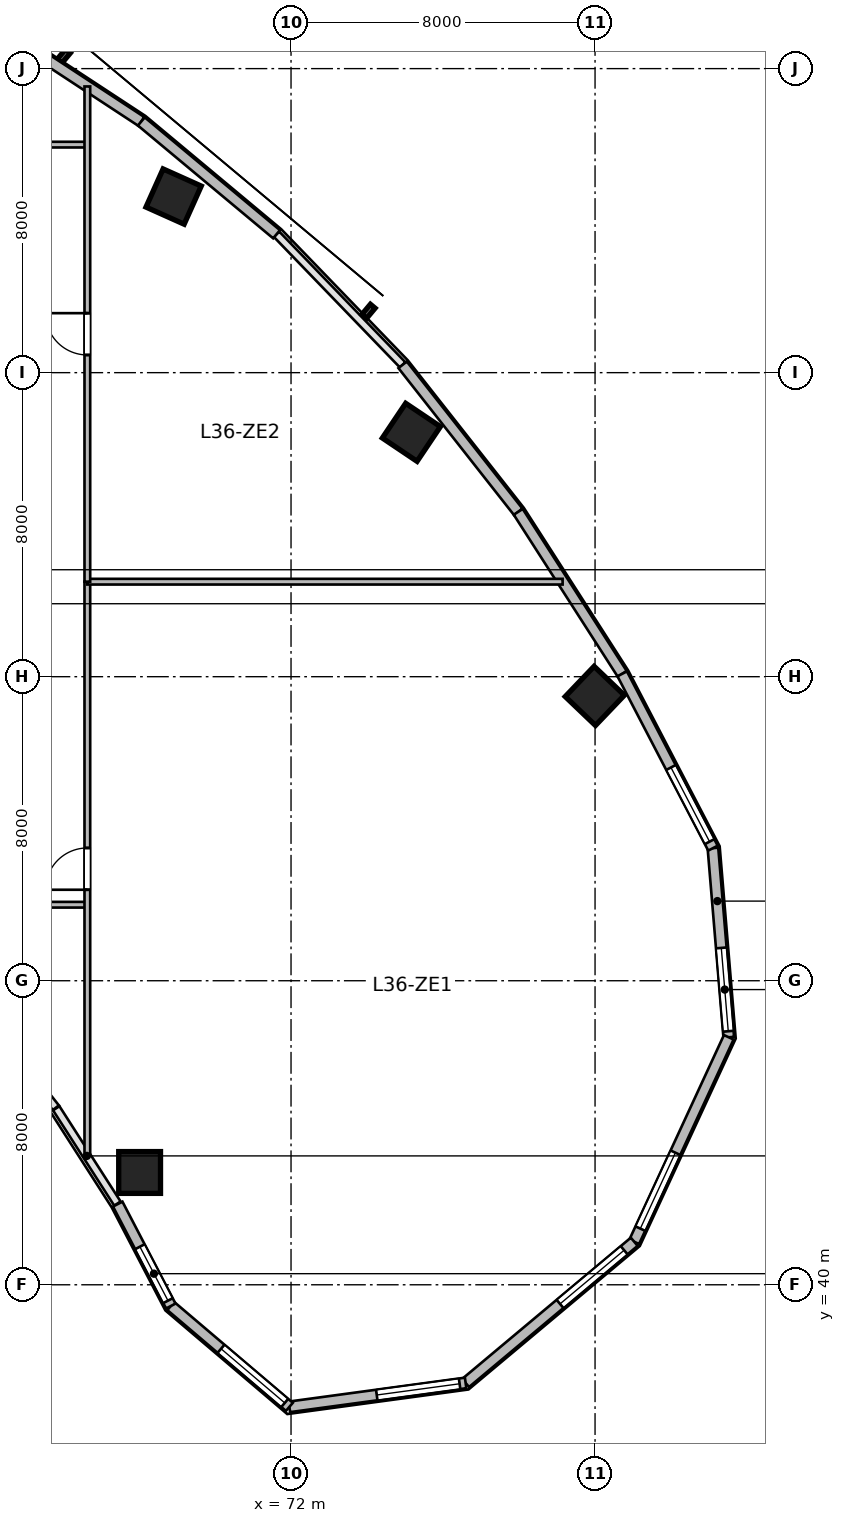
"""IFC4 building model, lengths in metres.
Left out: names, types, materials, properties, quantities, classifications, styles, units other than length and angle.
Written with IfcOpenShell. Run it as: python <this file> out.ifc"""

import sys

from ifc_helpers import new_model, si_unit, direction, frame, frame_2d, origin, origin_2d, place, context, subcontext, project, spatial, rectangle, circle, extrude, source, transform, mapped, element, fill, save


model = new_model("IFC4")
c1 = context("Model", 3, precision=1e-05, world=origin(), true_north=direction((0.0, 1.0)))
c2 = subcontext(c1, "Body", "Model", "MODEL_VIEW")
j1 = project(units=[si_unit("LENGTHUNIT", "METRE"), si_unit("PLANEANGLEUNIT", "RADIAN")], contexts=[c1])
p1 = place(None, origin())
s1 = spatial("IfcSite", under=j1, at=p1, CompositionType="ELEMENT")
p2 = place(p1, origin())
s2 = spatial("IfcBuilding", under=s1, at=p2, CompositionType="ELEMENT")
p3 = place(p2, frame((0.0, 0.0, 150.6)))
s3 = spatial("IfcBuildingStorey", under=s2, at=p3, CompositionType="ELEMENT", Elevation=150.6)
m1 = source(origin(), c2, "Body", "SweptSolid", [
    extrude(rectangle(XDim=1.1, YDim=1.1, at=origin_2d()), origin(), (0.0, 0.0, 1.0), 3.9),
])
for number, where, z_axis, x_axis in (
    (1, (68.91, 68.633, 0.0), (0.0, 0.0, 1.0), (0.409, 0.912, 0.0)),
    (2, (75.167, 62.43, 0.0), (0.0, 0.0, 1.0), (0.558, 0.83, 0.0)),
):
    element("IfcColumn", number, at=place(p3, frame(where, z_axis=z_axis, x_axis=x_axis)), inside=s3, PredefinedType="COLUMN", context=c2, shape_type="MappedRepresentation", body=[
        mapped(m1, transform((0.0, 0.0, 0.0), scale=1.0)),
    ])
m2 = source(origin(), c2, "Body", "SweptSolid", [
    extrude(circle(Radius=0.55, at=origin_2d()), origin(), (0.0, 0.0, 1.0), 3.9),
])
p4 = place(p3, frame((68.015, 42.955, 0.0), z_axis=(0.0, 0.0, 1.0), x_axis=(0.690756218984, 0.723087716626, 0.0)))
e3 = element("IfcColumn", 3, at=p4, inside=s3, PredefinedType="COLUMN", context=c2, shape_type="MappedRepresentation", body=[
    mapped(m2, transform((0.0, 0.0, 0.0), scale=1.0)),
])
p5 = place(p3, frame((79.993, 55.494, 0.0), z_axis=(0.0, 0.0, 1.0), x_axis=(0.690756218984, 0.723087716626, 0.0)))
e4 = element("IfcColumn", 4, at=p5, inside=s3, PredefinedType="COLUMN", context=c2, shape_type="MappedRepresentation", body=[
    mapped(m1, transform((0.0, 0.0, 0.0), scale=1.0)),
])
m3 = source(origin(), c2, "Body", "SweptSolid", [
    extrude(rectangle(XDim=4.994, YDim=0.28, at=frame_2d((2.497, 0.0))), origin(), (0.0, 0.0, 1.0), 3.65),
])
p6 = place(p3, frame((83.102, 51.489, 0.0), z_axis=(0.0, 0.0, 1.0), x_axis=(0.083344839916, -0.996520766296, 0.0)))
e5 = element("IfcWall", 5, at=p6, inside=s3, PredefinedType="SOLIDWALL", context=c2, shape_type="MappedRepresentation", body=[
    mapped(m3, transform((0.0, 0.0, 0.0), scale=1.0)),
])
p7 = place(p6, frame((2.635, 0.0, 0.95)))
e6 = element("IfcOpeningElement", 6, at=p7, cuts=e5, PredefinedType="OPENING", context=c2, shape_type="SweptSolid", body=[
    extrude(rectangle(XDim=2.2, YDim=2.1, at=frame_2d((1.1, 1.05))), frame((0.0, 0.15, 0.0), z_axis=(0.0, -1.0, 0.0), x_axis=(1.0, 0.0, 0.0)), (0.0, 0.0, 1.0), 0.3),
])
m4 = source(origin(), c2, "Body", "SweptSolid", [
    extrude(rectangle(XDim=5.927, YDim=0.28, at=frame_2d((2.964, 0.0))), origin(), (0.0, 0.0, 1.0), 3.65),
])
p8 = place(p3, frame((83.519, 46.512, 0.0), z_axis=(0.0, 0.0, 1.0), x_axis=(-0.419656204795, -0.907683132914, 0.0)))
e7 = element("IfcWall", 7, at=p8, inside=s3, PredefinedType="SOLIDWALL", context=c2, shape_type="MappedRepresentation", body=[
    mapped(m4, transform((0.0, 0.0, 0.0), scale=1.0)),
])
p9 = place(p8, frame((3.346, 0.0, 0.95)))
e8 = element("IfcOpeningElement", 8, at=p9, cuts=e7, PredefinedType="OPENING", context=c2, shape_type="SweptSolid", body=[
    extrude(rectangle(XDim=2.2, YDim=2.1, at=frame_2d((1.1, 1.05))), frame((0.0, 0.15, 0.0), z_axis=(0.0, -1.0, 0.0), x_axis=(1.0, 0.0, 0.0)), (0.0, 0.0, 1.0), 0.3),
])
m5 = source(origin(), c2, "Body", "SweptSolid", [
    extrude(rectangle(XDim=5.786, YDim=0.28, at=frame_2d((2.893, 0.0))), origin(), (0.0, 0.0, 1.0), 3.65),
])
p10 = place(p3, frame((81.031, 41.131, 0.0), z_axis=(0.0, 0.0, 1.0), x_axis=(-0.766711306852, -0.641992034176, 0.0)))
e9 = element("IfcWall", 9, at=p10, inside=s3, PredefinedType="SOLIDWALL", context=c2, shape_type="MappedRepresentation", body=[
    mapped(m5, transform((0.0, 0.0, 0.0), scale=1.0)),
])
p11 = place(p10, frame((0.347, 0.0, 0.95)))
e10 = element("IfcOpeningElement", 10, at=p11, cuts=e9, PredefinedType="OPENING", context=c2, shape_type="SweptSolid", body=[
    extrude(rectangle(XDim=2.2, YDim=2.1, at=frame_2d((1.1, 1.05))), frame((0.0, 0.15, 0.0), z_axis=(0.0, -1.0, 0.0), x_axis=(1.0, 0.0, 0.0)), (0.0, 0.0, 1.0), 0.3),
])
m6 = source(origin(), c2, "Body", "SweptSolid", [
    extrude(rectangle(XDim=4.68, YDim=0.28, at=frame_2d((2.34, 0.0))), origin(), (0.0, 0.0, 1.0), 3.65),
])
p12 = place(p3, frame((76.594, 37.417, 0.0), z_axis=(0.0, 0.0, 1.0), x_axis=(-0.990931146435, -0.134370618162, 0.0)))
e11 = element("IfcWall", 11, at=p12, inside=s3, PredefinedType="SOLIDWALL", context=c2, shape_type="MappedRepresentation", body=[
    mapped(m6, transform((0.0, 0.0, 0.0), scale=1.0)),
])
p13 = place(p12, frame((0.16, 0.0, 0.95)))
e12 = element("IfcOpeningElement", 12, at=p13, cuts=e11, PredefinedType="OPENING", context=c2, shape_type="SweptSolid", body=[
    extrude(rectangle(XDim=2.2, YDim=2.1, at=frame_2d((1.1, 1.05))), frame((0.0, 0.15, 0.0), z_axis=(0.0, -1.0, 0.0), x_axis=(1.0, 0.0, 0.0)), (0.0, 0.0, 1.0), 0.3),
])
m7 = source(origin(), c2, "Body", "SweptSolid", [
    extrude(rectangle(XDim=4.096, YDim=0.28, at=frame_2d((2.048, 0.0))), origin(), (0.0, 0.0, 1.0), 3.65),
])
p14 = place(p3, frame((71.957, 36.788, 0.0), z_axis=(0.0, 0.0, 1.0), x_axis=(-0.761926081737, 0.647663991564, 0.0)))
e13 = element("IfcWall", 13, at=p14, inside=s3, PredefinedType="SOLIDWALL", context=c2, shape_type="MappedRepresentation", body=[
    mapped(m7, transform((0.0, 0.0, 0.0), scale=1.0)),
])
p15 = place(p14, frame((0.16, 0.0, 0.95)))
e14 = element("IfcOpeningElement", 14, at=p15, cuts=e13, PredefinedType="OPENING", context=c2, shape_type="SweptSolid", body=[
    extrude(rectangle(XDim=2.2, YDim=2.1, at=frame_2d((1.1, 1.05))), frame((0.0, 0.15, 0.0), z_axis=(0.0, -1.0, 0.0), x_axis=(1.0, 0.0, 0.0)), (0.0, 0.0, 1.0), 0.3),
])
m8 = source(origin(), c2, "Body", "SweptSolid", [
    extrude(rectangle(XDim=3.024, YDim=0.28, at=frame_2d((1.512, 0.0))), origin(), (0.0, 0.0, 1.0), 3.65),
])
p16 = place(p3, frame((68.836, 39.44, 0.0), z_axis=(0.0, 0.0, 1.0), x_axis=(-0.461718746531, 0.887026380161, 0.0)))
e15 = element("IfcWall", 15, at=p16, inside=s3, PredefinedType="SOLIDWALL", context=c2, shape_type="MappedRepresentation", body=[
    mapped(m8, transform((0.0, 0.0, 0.0), scale=1.0)),
])
p17 = place(p16, frame((0.16, 0.0, 0.95)))
e16 = element("IfcOpeningElement", 16, at=p17, cuts=e15, PredefinedType="OPENING", context=c2, shape_type="SweptSolid", body=[
    extrude(rectangle(XDim=1.6, YDim=1.9, at=frame_2d((0.8, 0.95))), frame((0.0, 0.15, 0.0), z_axis=(0.0, -1.0, 0.0), x_axis=(1.0, 0.0, 0.0)), (0.0, 0.0, 1.0), 0.3),
])
m9 = source(origin(), c2, "Body", "SweptSolid", [
    extrude(rectangle(XDim=4.501, YDim=0.28, at=frame_2d((2.25, 0.0))), origin(), (0.0, 0.0, 1.0), 3.65),
])
p18 = place(p3, frame((64.298, 73.08, 0.0), z_axis=(0.0, 0.0, 1.0), x_axis=(0.835984920737, -0.548752414391, 0.0)))
e17 = element("IfcWall", 17, at=p18, inside=s3, PredefinedType="SOLIDWALL", context=c2, shape_type="MappedRepresentation", body=[
    mapped(m9, transform((0.0, 0.0, 0.0), scale=1.0)),
])
m10 = source(origin(), c2, "Body", "SweptSolid", [
    extrude(rectangle(XDim=4.634, YDim=0.28, at=frame_2d((2.317, 0.0))), origin(), (0.0, 0.0, 1.0), 3.65),
])
p19 = place(p3, frame((68.061, 70.61, 0.0), z_axis=(0.0, 0.0, 1.0), x_axis=(0.767910229096, -0.640557475993, 0.0)))
e18 = element("IfcWall", 18, at=p19, inside=s3, PredefinedType="SOLIDWALL", context=c2, shape_type="MappedRepresentation", body=[
    mapped(m10, transform((0.0, 0.0, 0.0), scale=1.0)),
])
m11 = source(origin(), c2, "Body", "SweptSolid", [
    extrude(rectangle(XDim=4.922, YDim=0.28, at=frame_2d((2.461, 0.0))), origin(), (0.0, 0.0, 1.0), 3.65),
])
p20 = place(p3, frame((74.936, 64.206, 0.0), z_axis=(0.0, 0.0, 1.0), x_axis=(0.61817639101, -0.786039407153, 0.0)))
e19 = element("IfcWall", 19, at=p20, inside=s3, PredefinedType="SOLIDWALL", context=c2, shape_type="MappedRepresentation", body=[
    mapped(m11, transform((0.0, 0.0, 0.0), scale=1.0)),
])
m12 = source(origin(), c2, "Body", "SweptSolid", [
    extrude(rectangle(XDim=5.065, YDim=0.28, at=frame_2d((2.532, 0.0))), origin(), (0.0, 0.0, 1.0), 3.65),
])
p21 = place(p3, frame((77.979, 60.338, 0.0), z_axis=(0.0, 0.0, 1.0), x_axis=(0.540177618806, -0.841551032404, 0.0)))
e20 = element("IfcWall", 20, at=p21, inside=s3, PredefinedType="SOLIDWALL", context=c2, shape_type="MappedRepresentation", body=[
    mapped(m12, transform((0.0, 0.0, 0.0), scale=1.0)),
])
m13 = source(origin(), c2, "Body", "SweptSolid", [
    extrude(rectangle(XDim=5.171, YDim=0.28, at=frame_2d((2.585, 0.0))), origin(), (0.0, 0.0, 1.0), 3.65),
])
p22 = place(p3, frame((80.715, 56.075, 0.0), z_axis=(0.0, 0.0, 1.0), x_axis=(0.461752581363, -0.887008767491, 0.0)))
e21 = element("IfcWall", 21, at=p22, inside=s3, PredefinedType="SOLIDWALL", context=c2, shape_type="MappedRepresentation", body=[
    mapped(m13, transform((0.0, 0.0, 0.0), scale=1.0)),
])
p23 = place(p22, frame((2.778, 0.0, 0.95)))
e22 = element("IfcOpeningElement", 22, at=p23, cuts=e21, PredefinedType="OPENING", context=c2, shape_type="SweptSolid", body=[
    extrude(rectangle(XDim=2.2, YDim=2.1, at=frame_2d((1.1, 1.05))), frame((0.0, 0.15, 0.0), z_axis=(0.0, -1.0, 0.0), x_axis=(1.0, 0.0, 0.0)), (0.0, 0.0, 1.0), 0.3),
])
m14 = source(origin(), c2, "Body", "SweptSolid", [
    extrude(rectangle(XDim=2.5, YDim=0.15, at=frame_2d((1.25, 0.0))), origin(), (0.0, 0.0, 1.0), 3.65),
])
for number, where, z_axis, x_axis in (
    (23, (64.1, 50.0, 0.0), (0.0, 0.0, 1.0), (1.0, 0.0, 0.0)),
    (24, (64.1, 70.0, 0.0), (0.0, 0.0, 1.0), (1.0, 0.0, 0.0)),
):
    element("IfcWall", number, at=place(p3, frame(where, z_axis=z_axis, x_axis=x_axis)), inside=s3, PredefinedType="PARTITIONING", context=c2, shape_type="MappedRepresentation", body=[
        mapped(m14, transform((0.0, 0.0, 0.0), scale=1.0)),
    ])
m15 = source(origin(), c2, "Body", "SweptSolid", [
    extrude(rectangle(XDim=15.112, YDim=0.15, at=frame_2d((7.556, 0.0))), origin(), (0.0, 0.0, 1.0), 2.942),
])
p24 = place(p3, frame((66.64, 43.388, 0.0), z_axis=(0.0, 0.0, 1.0), x_axis=(0.0, 1.0, 0.0)))
e25 = element("IfcWall", 25, at=p24, inside=s3, PredefinedType="PARTITIONING", context=c2, shape_type="MappedRepresentation", body=[
    mapped(m15, transform((0.0, 0.0, 0.0), scale=1.0)),
])
p25 = place(p24, frame((7.006, 0.0, 0.0)))
e26 = element("IfcOpeningElement", 26, at=p25, cuts=e25, PredefinedType="OPENING", context=c2, shape_type="SweptSolid", body=[
    extrude(rectangle(XDim=1.1, YDim=2.15, at=frame_2d((0.55, 1.075))), frame((0.0, 0.085, 0.0), z_axis=(0.0, -1.0, 0.0), x_axis=(1.0, 0.0, 0.0)), (0.0, 0.0, 1.0), 0.17),
])
m16 = source(origin(), c2, "Body", "SweptSolid", [
    extrude(rectangle(XDim=12.507, YDim=0.15, at=frame_2d((6.253, 0.0))), origin(), (0.0, 0.0, 1.0), 3.65),
])
p26 = place(p3, frame((66.64, 58.5, 0.0), z_axis=(0.0, 0.0, 1.0), x_axis=(1.0, 0.0, 0.0)))
e27 = element("IfcWall", 27, at=p26, inside=s3, PredefinedType="PARTITIONING", context=c2, shape_type="MappedRepresentation", body=[
    mapped(m16, transform((0.0, 0.0, 0.0), scale=1.0)),
])
m17 = source(origin(), c2, "Body", "SweptSolid", [
    extrude(rectangle(XDim=13.031, YDim=0.15, at=frame_2d((6.515, 0.0))), origin(), (0.0, 0.0, 1.0), 2.942),
])
p27 = place(p3, frame((66.64, 58.5, 0.0), z_axis=(0.0, 0.0, 1.0), x_axis=(0.0, 1.0, 0.0)))
e28 = element("IfcWall", 28, at=p27, inside=s3, PredefinedType="PARTITIONING", context=c2, shape_type="MappedRepresentation", body=[
    mapped(m17, transform((0.0, 0.0, 0.0), scale=1.0)),
])
p28 = place(p27, frame((5.965, 0.0, 0.0)))
e29 = element("IfcOpeningElement", 29, at=p28, cuts=e28, PredefinedType="OPENING", context=c2, shape_type="SweptSolid", body=[
    extrude(rectangle(XDim=1.1, YDim=2.15, at=frame_2d((0.55, 1.075))), frame((0.0, 0.085, 0.0), z_axis=(0.0, -1.0, 0.0), x_axis=(1.0, 0.0, 0.0)), (0.0, 0.0, 1.0), 0.17),
])
m18 = source(origin(), c2, "Body", "SweptSolid", [
    extrude(rectangle(XDim=2.2, YDim=2.1, at=frame_2d((1.1, 1.05))), frame((0.0, 0.03, 0.0), z_axis=(0.0, -1.0, 0.0), x_axis=(1.0, 0.0, 0.0)), (0.0, 0.0, 1.0), 0.06),
])
p29 = place(p7, origin())
e30 = element("IfcWindow", 30, at=p29, inside=s3, PartitioningType="TRIPLE_PANEL_VERTICAL", PredefinedType="WINDOW", context=c2, shape_type="MappedRepresentation", body=[
    mapped(m18, transform((0.0, 0.0, 0.0), scale=1.0)),
])
fill(e6, e30)
p30 = place(p9, origin())
e31 = element("IfcWindow", 31, at=p30, inside=s3, PartitioningType="TRIPLE_PANEL_VERTICAL", PredefinedType="WINDOW", context=c2, shape_type="MappedRepresentation", body=[
    mapped(m18, transform((0.0, 0.0, 0.0), scale=1.0)),
])
fill(e8, e31)
p31 = place(p11, origin())
e32 = element("IfcWindow", 32, at=p31, inside=s3, PartitioningType="TRIPLE_PANEL_VERTICAL", PredefinedType="WINDOW", context=c2, shape_type="MappedRepresentation", body=[
    mapped(m18, transform((0.0, 0.0, 0.0), scale=1.0)),
])
fill(e10, e32)
p32 = place(p13, origin())
e33 = element("IfcWindow", 33, at=p32, inside=s3, PartitioningType="TRIPLE_PANEL_VERTICAL", PredefinedType="WINDOW", context=c2, shape_type="MappedRepresentation", body=[
    mapped(m18, transform((0.0, 0.0, 0.0), scale=1.0)),
])
fill(e12, e33)
p33 = place(p15, origin())
e34 = element("IfcWindow", 34, at=p33, inside=s3, PartitioningType="TRIPLE_PANEL_VERTICAL", PredefinedType="WINDOW", context=c2, shape_type="MappedRepresentation", body=[
    mapped(m18, transform((0.0, 0.0, 0.0), scale=1.0)),
])
fill(e14, e34)
m19 = source(origin(), c2, "Body", "SweptSolid", [
    extrude(rectangle(XDim=1.6, YDim=1.9, at=frame_2d((0.8, 0.95))), frame((0.0, 0.03, 0.0), z_axis=(0.0, -1.0, 0.0), x_axis=(1.0, 0.0, 0.0)), (0.0, 0.0, 1.0), 0.06),
])
p34 = place(p17, origin())
e35 = element("IfcWindow", 35, at=p34, inside=s3, PartitioningType="SINGLE_PANEL", PredefinedType="WINDOW", context=c2, shape_type="MappedRepresentation", body=[
    mapped(m19, transform((0.0, 0.0, 0.0), scale=1.0)),
])
fill(e16, e35)
p35 = place(p23, origin())
e36 = element("IfcWindow", 36, at=p35, inside=s3, PartitioningType="TRIPLE_PANEL_VERTICAL", PredefinedType="WINDOW", context=c2, shape_type="MappedRepresentation", body=[
    mapped(m18, transform((0.0, 0.0, 0.0), scale=1.0)),
])
fill(e22, e36)
m20 = source(origin(), c2, "Body", "SweptSolid", [
    extrude(rectangle(XDim=1.1, YDim=2.15, at=frame_2d((0.55, 1.075))), frame((0.0, 0.025, 0.0), z_axis=(0.0, -1.0, 0.0), x_axis=(1.0, 0.0, 0.0)), (0.0, 0.0, 1.0), 0.05),
])
p36 = place(p25, origin())
e37 = element("IfcDoor", 37, at=p36, inside=s3, OperationType="SINGLE_SWING_LEFT", PredefinedType="DOOR", context=c2, shape_type="MappedRepresentation", body=[
    mapped(m20, transform((0.0, 0.0, 0.0), scale=1.0)),
])
fill(e26, e37)
p37 = place(p28, origin())
e38 = element("IfcDoor", 38, at=p37, inside=s3, OperationType="SINGLE_SWING_RIGHT", PredefinedType="DOOR", context=c2, shape_type="MappedRepresentation", body=[
    mapped(m20, transform((0.0, 0.0, 0.0), scale=1.0)),
])
fill(e29, e38)
save(model, sys.argv[1])
